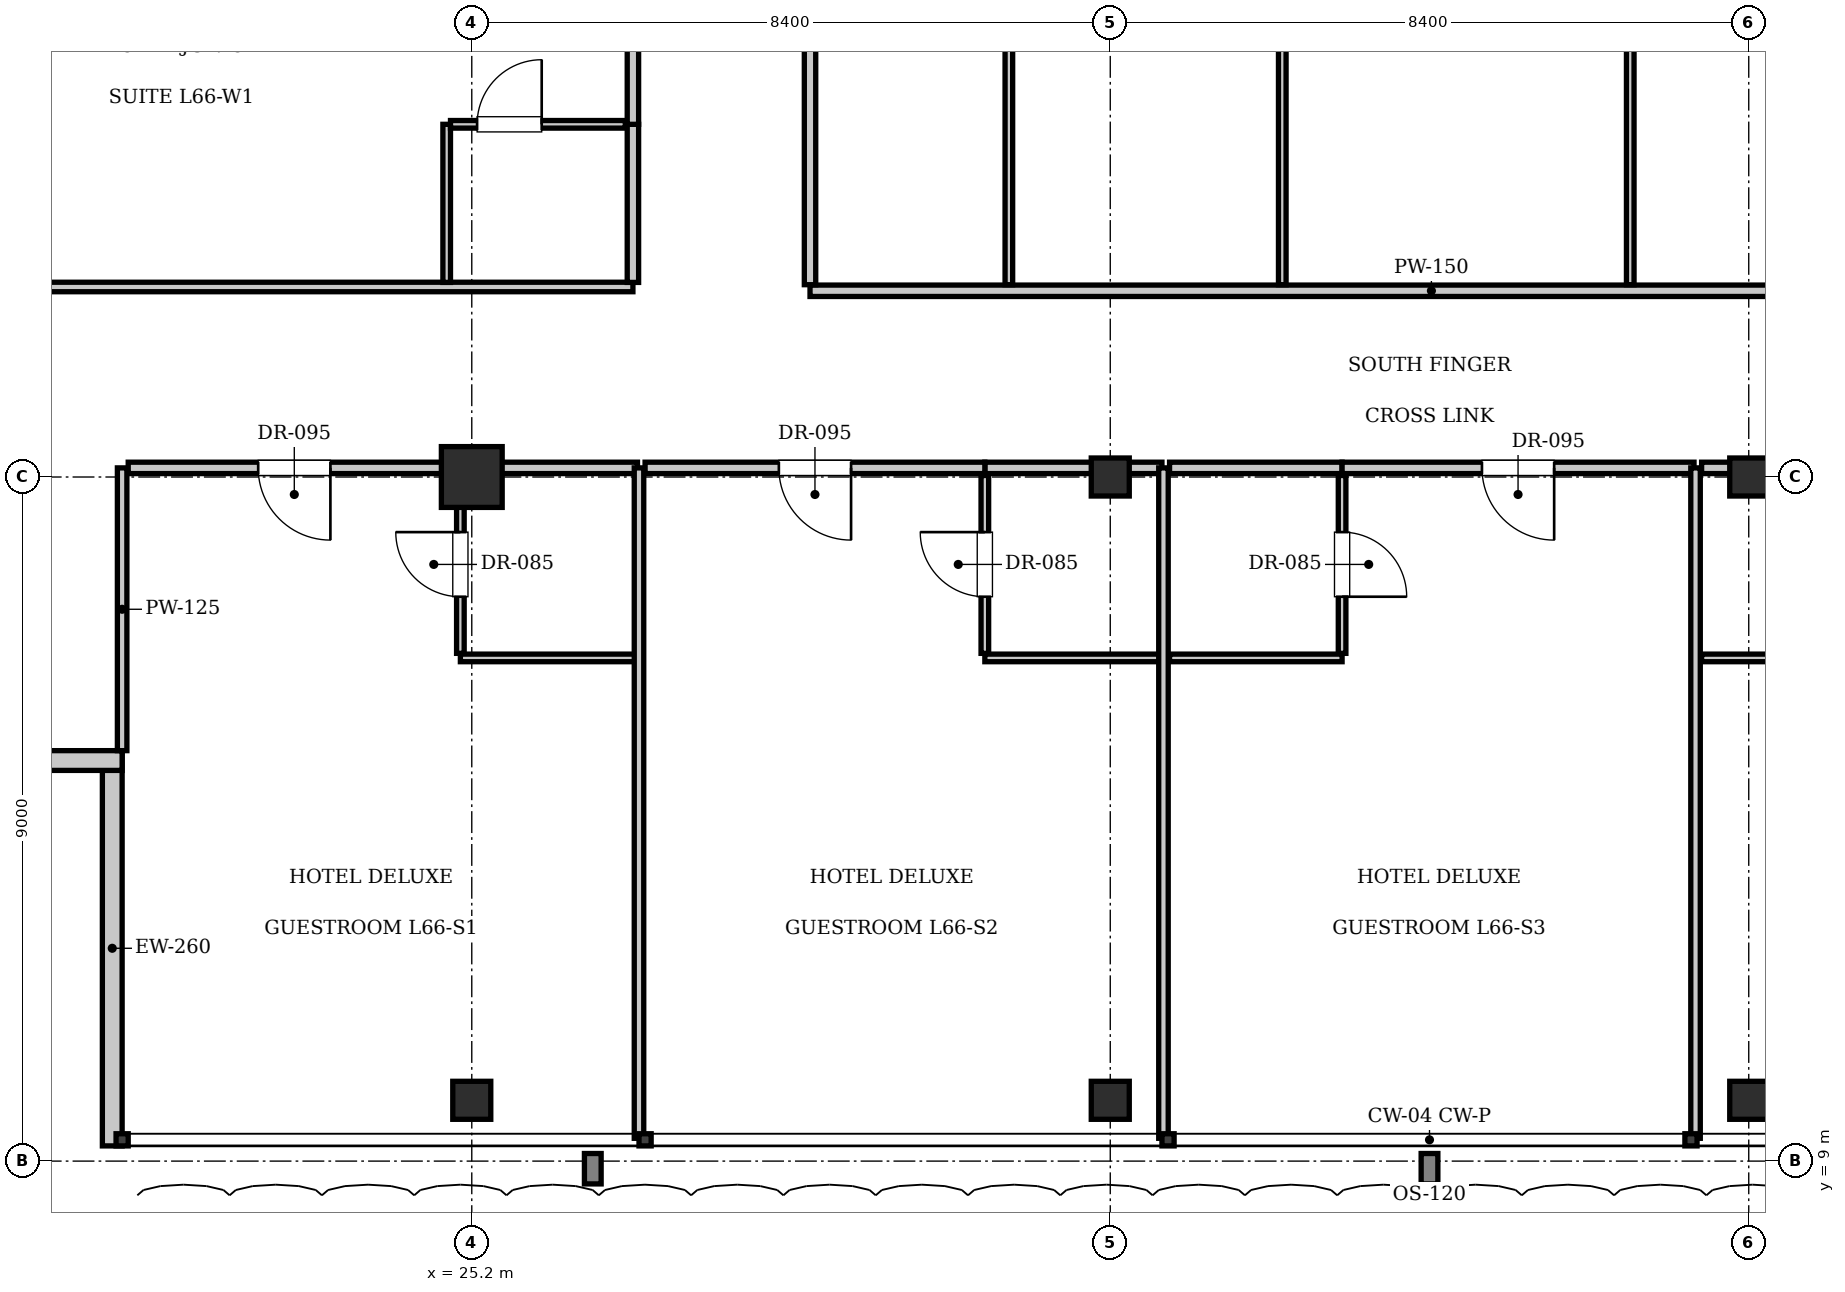
"""IFC4 building model, lengths in metres.
Left out: names, types, materials, properties, quantities, classifications, styles, units other than length and angle.
Written with IfcOpenShell. Run it as: python <this file> out.ifc"""

import sys

from ifc_helpers import new_model, si_unit, direction, frame, frame_2d, origin, origin_2d, place, context, subcontext, project, spatial, rectangle, i_section, extrude, element, fill, save


model = new_model("IFC4")
c1 = context("Model", 3, precision=1e-05, world=origin(), true_north=direction((0.0, 1.0)))
c2 = subcontext(c1, "Body", "Model", "MODEL_VIEW")
j1 = project(units=[si_unit("LENGTHUNIT", "METRE"), si_unit("PLANEANGLEUNIT", "RADIAN")], contexts=[c1])
p1 = place(None, origin())
s1 = spatial("IfcSite", under=j1, at=p1, CompositionType="ELEMENT")
p2 = place(p1, origin())
s2 = spatial("IfcBuilding", under=s1, at=p2, CompositionType="ELEMENT")
p3 = place(p2, frame((0.0, 0.0, 270.2)))
s3 = spatial("IfcBuildingStorey", under=s2, at=p3, CompositionType="ELEMENT", Elevation=270.2)
p4 = place(p3, frame((25.2, 18.0, 0.0), z_axis=(0.0, 0.0, 1.0), x_axis=(1.0, 0.0, 0.0)))
e1 = element("IfcColumn", 1, at=p4, inside=s3, PredefinedType="COLUMN", context=c2, shape_type="SweptSolid", body=[
    extrude(rectangle(XDim=0.8, YDim=0.8, at=origin_2d()), origin(), (0.0, 0.0, 1.0), 3.85),
])
for number, where, z_axis, x_axis in (
    (2, (33.6, 18.0, 0.0), (0.0, 0.0, 1.0), (1.0, 0.0, 0.0)),
    (3, (42.0, 18.0, 0.0), (0.0, 0.0, 1.0), (1.0, 0.0, 0.0)),
    (4, (25.2, 9.8, 0.0), (0.0, 0.0, 1.0), (1.0, 0.0, 0.0)),
    (5, (33.6, 9.8, 0.0), (0.0, 0.0, 1.0), (1.0, 0.0, 0.0)),
    (6, (42.0, 9.8, 0.0), (0.0, 0.0, 1.0), (1.0, 0.0, 0.0)),
):
    element("IfcColumn", number, at=place(p3, frame(where, z_axis=z_axis, x_axis=x_axis)), inside=s3, PredefinedType="COLUMN", context=c2, shape_type="SweptSolid", body=[
        extrude(i_section(OverallWidth=0.5, OverallDepth=0.5, WebThickness=0.022, FlangeThickness=0.032, at=origin_2d()), origin(), (0.0, 0.0, 1.0), 3.85),
    ])
p5 = place(p3, frame((20.47, 9.2, 0.0), z_axis=(0.0, 0.0, 1.0), x_axis=(0.0, 1.0, 0.0)))
e7 = element("IfcWall", 7, at=p5, inside=s3, PredefinedType="SOLIDWALL", context=c2, shape_type="SweptSolid", body=[
    extrude(rectangle(XDim=5.2, YDim=0.26, at=frame_2d((2.6, 0.0))), origin(), (0.0, 0.0, 1.0), 3.61),
])
p6 = place(p3, frame((20.6, 14.27, 0.0), z_axis=(0.0, 0.0, 1.0), x_axis=(-1.0, 0.0, 0.0)))
e8 = element("IfcWall", 8, at=p6, inside=s3, PredefinedType="SOLIDWALL", context=c2, shape_type="SweptSolid", body=[
    extrude(rectangle(XDim=5.2, YDim=0.26, at=frame_2d((2.6, 0.0))), origin(), (0.0, 0.0, 1.0), 3.61),
])
p7 = place(p6, frame((1.6, 0.0, 0.9)))
e9 = element("IfcOpeningElement", 9, at=p7, cuts=e8, PredefinedType="OPENING", context=c2, shape_type="SweptSolid", body=[
    extrude(rectangle(XDim=2.0, YDim=2.2, at=frame_2d((1.0, 1.1))), frame((0.0, 0.14, 0.0), z_axis=(0.0, -1.0, 0.0), x_axis=(1.0, 0.0, 0.0)), (0.0, 0.0, 1.0), 0.28),
])
p8 = place(p3, frame((29.65, 20.45, 0.0), z_axis=(0.0, 0.0, 1.0), x_axis=(1.0, 0.0, 0.0)))
e10 = element("IfcWall", 10, at=p8, inside=s3, PredefinedType="PARTITIONING", context=c2, shape_type="SweptSolid", body=[
    extrude(rectangle(XDim=16.35, YDim=0.15, at=frame_2d((8.175, 0.0))), origin(), (0.0, 0.0, 1.0), 3.61),
])
p9 = place(p3, frame((29.65, 20.53, 0.0), z_axis=(0.0, 0.0, 1.0), x_axis=(0.0, 1.0, 0.0)))
e11 = element("IfcWall", 11, at=p9, inside=s3, PredefinedType="PARTITIONING", context=c2, shape_type="SweptSolid", body=[
    extrude(rectangle(XDim=9.29, YDim=0.15, at=frame_2d((4.645, 0.0))), origin(), (0.0, 0.0, 1.0), 3.61),
])
for number, where, z_axis, x_axis in (
    (12, (32.266, 20.53, 0.0), (0.0, 0.0, 1.0), (0.0, 1.0, 0.0)),
    (13, (35.863, 20.53, 0.0), (0.0, 0.0, 1.0), (0.0, 1.0, 0.0)),
    (14, (40.441, 20.53, 0.0), (0.0, 0.0, 1.0), (0.0, 1.0, 0.0)),
):
    element("IfcWall", number, at=place(p3, frame(where, z_axis=z_axis, x_axis=x_axis)), inside=s3, PredefinedType="PARTITIONING", context=c2, shape_type="SweptSolid", body=[
        extrude(rectangle(XDim=9.29, YDim=0.1, at=frame_2d((4.645, 0.0))), origin(), (0.0, 0.0, 1.0), 3.61),
    ])
p10 = place(p3, frame((20.6, 14.4, 0.0), z_axis=(0.0, 0.0, 1.0), x_axis=(0.0, 1.0, 0.0)))
e15 = element("IfcWall", 15, at=p10, inside=s3, PredefinedType="PARTITIONING", context=c2, shape_type="SweptSolid", body=[
    extrude(rectangle(XDim=3.72, YDim=0.125, at=frame_2d((1.86, 0.0))), origin(), (0.0, 0.0, 1.0), 3.61),
])
p11 = place(p3, frame((25.05, 18.12, 0.0), z_axis=(0.0, 0.0, 1.0), x_axis=(1.0, 0.0, 0.0)))
e16 = element("IfcWall", 16, at=p11, inside=s3, PredefinedType="PARTITIONING", context=c2, shape_type="SweptSolid", body=[
    extrude(rectangle(XDim=2.33, YDim=0.15, at=frame_2d((1.165, 0.0))), origin(), (0.0, 0.0, 1.0), 3.077),
])
p12 = place(p3, frame((25.05, 15.62, 0.0), z_axis=(0.0, 0.0, 1.0), x_axis=(1.0, 0.0, 0.0)))
e17 = element("IfcWall", 17, at=p12, inside=s3, PredefinedType="PARTITIONING", context=c2, shape_type="SweptSolid", body=[
    extrude(rectangle(XDim=2.31, YDim=0.1, at=frame_2d((1.155, 0.0))), origin(), (0.0, 0.0, 1.0), 3.61),
])
p13 = place(p3, frame((25.05, 15.68, 0.0), z_axis=(0.0, 0.0, 1.0), x_axis=(0.0, 1.0, 0.0)))
e18 = element("IfcWall", 18, at=p13, inside=s3, PredefinedType="PARTITIONING", context=c2, shape_type="SweptSolid", body=[
    extrude(rectangle(XDim=2.34, YDim=0.1, at=frame_2d((1.17, 0.0))), origin(), (0.0, 0.0, 1.0), 3.61),
])
p14 = place(p13, frame((0.745, 0.0, 0.0)))
e19 = element("IfcOpeningElement", 19, at=p14, cuts=e18, PredefinedType="OPENING", context=c2, shape_type="SweptSolid", body=[
    extrude(rectangle(XDim=0.85, YDim=2.1, at=frame_2d((0.425, 1.05))), frame((0.0, 0.06, 0.0), z_axis=(0.0, -1.0, 0.0), x_axis=(1.0, 0.0, 0.0)), (0.0, 0.0, 1.0), 0.12),
])
p15 = place(p3, frame((20.68, 18.12, 0.0), z_axis=(0.0, 0.0, 1.0), x_axis=(1.0, 0.0, 0.0)))
e20 = element("IfcWall", 20, at=p15, inside=s3, PredefinedType="PARTITIONING", context=c2, shape_type="SweptSolid", body=[
    extrude(rectangle(XDim=4.37, YDim=0.15, at=frame_2d((2.185, 0.0))), origin(), (0.0, 0.0, 1.0), 3.077),
])
p16 = place(p15, frame((1.71, 0.0, 0.0)))
e21 = element("IfcOpeningElement", 21, at=p16, cuts=e20, PredefinedType="OPENING", context=c2, shape_type="SweptSolid", body=[
    extrude(rectangle(XDim=0.95, YDim=2.15, at=frame_2d((0.475, 1.075))), frame((0.0, 0.085, 0.0), z_axis=(0.0, -1.0, 0.0), x_axis=(1.0, 0.0, 0.0)), (0.0, 0.0, 1.0), 0.17),
])
p17 = place(p3, frame((27.4, 9.3, 0.0), z_axis=(0.0, 0.0, 1.0), x_axis=(0.0, 1.0, 0.0)))
e22 = element("IfcWall", 22, at=p17, inside=s3, PredefinedType="PARTITIONING", context=c2, shape_type="SweptSolid", body=[
    extrude(rectangle(XDim=8.82, YDim=0.125, at=frame_2d((4.41, 0.0))), origin(), (0.0, 0.0, 1.0), 3.61),
])
p18 = place(p3, frame((31.95, 18.12, 0.0), z_axis=(0.0, 0.0, 1.0), x_axis=(1.0, 0.0, 0.0)))
e23 = element("IfcWall", 23, at=p18, inside=s3, PredefinedType="PARTITIONING", context=c2, shape_type="SweptSolid", body=[
    extrude(rectangle(XDim=2.33, YDim=0.15, at=frame_2d((1.165, 0.0))), origin(), (0.0, 0.0, 1.0), 3.077),
])
p19 = place(p3, frame((31.95, 15.62, 0.0), z_axis=(0.0, 0.0, 1.0), x_axis=(1.0, 0.0, 0.0)))
e24 = element("IfcWall", 24, at=p19, inside=s3, PredefinedType="PARTITIONING", context=c2, shape_type="SweptSolid", body=[
    extrude(rectangle(XDim=2.31, YDim=0.1, at=frame_2d((1.155, 0.0))), origin(), (0.0, 0.0, 1.0), 3.61),
])
p20 = place(p3, frame((31.95, 15.68, 0.0), z_axis=(0.0, 0.0, 1.0), x_axis=(0.0, 1.0, 0.0)))
e25 = element("IfcWall", 25, at=p20, inside=s3, PredefinedType="PARTITIONING", context=c2, shape_type="SweptSolid", body=[
    extrude(rectangle(XDim=2.34, YDim=0.1, at=frame_2d((1.17, 0.0))), origin(), (0.0, 0.0, 1.0), 3.61),
])
p21 = place(p20, frame((0.745, 0.0, 0.0)))
e26 = element("IfcOpeningElement", 26, at=p21, cuts=e25, PredefinedType="OPENING", context=c2, shape_type="SweptSolid", body=[
    extrude(rectangle(XDim=0.85, YDim=2.1, at=frame_2d((0.425, 1.05))), frame((0.0, 0.06, 0.0), z_axis=(0.0, -1.0, 0.0), x_axis=(1.0, 0.0, 0.0)), (0.0, 0.0, 1.0), 0.12),
])
p22 = place(p3, frame((27.48, 18.12, 0.0), z_axis=(0.0, 0.0, 1.0), x_axis=(1.0, 0.0, 0.0)))
e27 = element("IfcWall", 27, at=p22, inside=s3, PredefinedType="PARTITIONING", context=c2, shape_type="SweptSolid", body=[
    extrude(rectangle(XDim=4.47, YDim=0.15, at=frame_2d((2.235, 0.0))), origin(), (0.0, 0.0, 1.0), 3.077),
])
p23 = place(p22, frame((1.76, 0.0, 0.0)))
e28 = element("IfcOpeningElement", 28, at=p23, cuts=e27, PredefinedType="OPENING", context=c2, shape_type="SweptSolid", body=[
    extrude(rectangle(XDim=0.95, YDim=2.15, at=frame_2d((0.475, 1.075))), frame((0.0, 0.085, 0.0), z_axis=(0.0, -1.0, 0.0), x_axis=(1.0, 0.0, 0.0)), (0.0, 0.0, 1.0), 0.17),
])
p24 = place(p3, frame((34.3, 9.3, 0.0), z_axis=(0.0, 0.0, 1.0), x_axis=(0.0, 1.0, 0.0)))
e29 = element("IfcWall", 29, at=p24, inside=s3, PredefinedType="PARTITIONING", context=c2, shape_type="SweptSolid", body=[
    extrude(rectangle(XDim=8.82, YDim=0.125, at=frame_2d((4.41, 0.0))), origin(), (0.0, 0.0, 1.0), 3.61),
])
p25 = place(p3, frame((34.38, 18.12, 0.0), z_axis=(0.0, 0.0, 1.0), x_axis=(1.0, 0.0, 0.0)))
e30 = element("IfcWall", 30, at=p25, inside=s3, PredefinedType="PARTITIONING", context=c2, shape_type="SweptSolid", body=[
    extrude(rectangle(XDim=2.27, YDim=0.15, at=frame_2d((1.135, 0.0))), origin(), (0.0, 0.0, 1.0), 3.077),
])
p26 = place(p3, frame((34.38, 15.62, 0.0), z_axis=(0.0, 0.0, 1.0), x_axis=(1.0, 0.0, 0.0)))
e31 = element("IfcWall", 31, at=p26, inside=s3, PredefinedType="PARTITIONING", context=c2, shape_type="SweptSolid", body=[
    extrude(rectangle(XDim=2.27, YDim=0.1, at=frame_2d((1.135, 0.0))), origin(), (0.0, 0.0, 1.0), 3.61),
])
p27 = place(p3, frame((36.65, 15.68, 0.0), z_axis=(0.0, 0.0, 1.0), x_axis=(0.0, 1.0, 0.0)))
e32 = element("IfcWall", 32, at=p27, inside=s3, PredefinedType="PARTITIONING", context=c2, shape_type="SweptSolid", body=[
    extrude(rectangle(XDim=2.34, YDim=0.1, at=frame_2d((1.17, 0.0))), origin(), (0.0, 0.0, 1.0), 3.61),
])
p28 = place(p27, frame((0.745, 0.0, 0.0)))
e33 = element("IfcOpeningElement", 33, at=p28, cuts=e32, PredefinedType="OPENING", context=c2, shape_type="SweptSolid", body=[
    extrude(rectangle(XDim=0.85, YDim=2.1, at=frame_2d((0.425, 1.05))), frame((0.0, 0.06, 0.0), z_axis=(0.0, -1.0, 0.0), x_axis=(1.0, 0.0, 0.0)), (0.0, 0.0, 1.0), 0.12),
])
p29 = place(p3, frame((36.65, 18.12, 0.0), z_axis=(0.0, 0.0, 1.0), x_axis=(1.0, 0.0, 0.0)))
e34 = element("IfcWall", 34, at=p29, inside=s3, PredefinedType="PARTITIONING", context=c2, shape_type="SweptSolid", body=[
    extrude(rectangle(XDim=4.63, YDim=0.15, at=frame_2d((2.315, 0.0))), origin(), (0.0, 0.0, 1.0), 3.077),
])
p30 = place(p29, frame((1.84, 0.0, 0.0)))
e35 = element("IfcOpeningElement", 35, at=p30, cuts=e34, PredefinedType="OPENING", context=c2, shape_type="SweptSolid", body=[
    extrude(rectangle(XDim=0.95, YDim=2.15, at=frame_2d((0.475, 1.075))), frame((0.0, 0.085, 0.0), z_axis=(0.0, -1.0, 0.0), x_axis=(1.0, 0.0, 0.0)), (0.0, 0.0, 1.0), 0.17),
])
p31 = place(p3, frame((41.3, 9.3, 0.0), z_axis=(0.0, 0.0, 1.0), x_axis=(0.0, 1.0, 0.0)))
e36 = element("IfcWall", 36, at=p31, inside=s3, PredefinedType="PARTITIONING", context=c2, shape_type="SweptSolid", body=[
    extrude(rectangle(XDim=8.82, YDim=0.125, at=frame_2d((4.41, 0.0))), origin(), (0.0, 0.0, 1.0), 3.61),
])
p32 = place(p3, frame((41.38, 18.12, 0.0), z_axis=(0.0, 0.0, 1.0), x_axis=(1.0, 0.0, 0.0)))
e37 = element("IfcWall", 37, at=p32, inside=s3, PredefinedType="PARTITIONING", context=c2, shape_type="SweptSolid", body=[
    extrude(rectangle(XDim=2.27, YDim=0.15, at=frame_2d((1.135, 0.0))), origin(), (0.0, 0.0, 1.0), 3.077),
])
p33 = place(p3, frame((41.38, 15.62, 0.0), z_axis=(0.0, 0.0, 1.0), x_axis=(1.0, 0.0, 0.0)))
e38 = element("IfcWall", 38, at=p33, inside=s3, PredefinedType="PARTITIONING", context=c2, shape_type="SweptSolid", body=[
    extrude(rectangle(XDim=2.27, YDim=0.1, at=frame_2d((1.135, 0.0))), origin(), (0.0, 0.0, 1.0), 3.61),
])
p34 = place(p3, frame((15.5, 20.5, 0.0), z_axis=(0.0, 0.0, 1.0), x_axis=(1.0, 0.0, 0.0)))
e39 = element("IfcWall", 39, at=p34, inside=s3, PredefinedType="PARTITIONING", context=c2, shape_type="SweptSolid", body=[
    extrude(rectangle(XDim=11.82, YDim=0.125, at=frame_2d((5.91, 0.0))), origin(), (0.0, 0.0, 1.0), 3.61),
])
p35 = place(p3, frame((27.32, 20.56, 0.0), z_axis=(0.0, 0.0, 1.0), x_axis=(0.0, 1.0, 0.0)))
e40 = element("IfcWall", 40, at=p35, inside=s3, PredefinedType="PARTITIONING", context=c2, shape_type="SweptSolid", body=[
    extrude(rectangle(XDim=2.08, YDim=0.15, at=frame_2d((1.04, 0.0))), origin(), (0.0, 0.0, 1.0), 3.61),
])
p36 = place(p3, frame((27.32, 22.64, 0.0), z_axis=(0.0, 0.0, 1.0), x_axis=(0.0, 1.0, 0.0)))
e41 = element("IfcWall", 41, at=p36, inside=s3, PredefinedType="PARTITIONING", context=c2, shape_type="SweptSolid", body=[
    extrude(rectangle(XDim=3.74, YDim=0.15, at=frame_2d((1.87, 0.0))), origin(), (0.0, 0.0, 1.0), 3.61),
])
p37 = place(p36, frame((1.395, 0.0, 0.0)))
e42 = element("IfcOpeningElement", 42, at=p37, cuts=e41, PredefinedType="OPENING", context=c2, shape_type="SweptSolid", body=[
    extrude(rectangle(XDim=0.95, YDim=2.15, at=frame_2d((0.475, 1.075))), frame((0.0, 0.085, 0.0), z_axis=(0.0, -1.0, 0.0), x_axis=(1.0, 0.0, 0.0)), (0.0, 0.0, 1.0), 0.17),
])
p38 = place(p3, frame((24.87, 20.56, 0.0), z_axis=(0.0, 0.0, 1.0), x_axis=(0.0, 1.0, 0.0)))
e43 = element("IfcWall", 43, at=p38, inside=s3, PredefinedType="PARTITIONING", context=c2, shape_type="SweptSolid", body=[
    extrude(rectangle(XDim=2.08, YDim=0.1, at=frame_2d((1.04, 0.0))), origin(), (0.0, 0.0, 1.0), 3.61),
])
p39 = place(p3, frame((24.92, 22.64, 0.0), z_axis=(0.0, 0.0, 1.0), x_axis=(1.0, 0.0, 0.0)))
e44 = element("IfcWall", 44, at=p39, inside=s3, PredefinedType="PARTITIONING", context=c2, shape_type="SweptSolid", body=[
    extrude(rectangle(XDim=2.3, YDim=0.1, at=frame_2d((1.15, 0.0))), origin(), (0.0, 0.0, 1.0), 3.61),
])
p40 = place(p39, frame((0.35, 0.0, 0.0)))
e45 = element("IfcOpeningElement", 45, at=p40, cuts=e44, PredefinedType="OPENING", context=c2, shape_type="SweptSolid", body=[
    extrude(rectangle(XDim=0.85, YDim=2.1, at=frame_2d((0.425, 1.05))), frame((0.0, 0.06, 0.0), z_axis=(0.0, -1.0, 0.0), x_axis=(1.0, 0.0, 0.0)), (0.0, 0.0, 1.0), 0.12),
])
p41 = place(p14, origin())
e46 = element("IfcDoor", 46, at=p41, inside=s3, OperationType="SINGLE_SWING_RIGHT", PredefinedType="DOOR", context=c2, shape_type="SweptSolid", body=[
    extrude(rectangle(XDim=0.85, YDim=2.1, at=frame_2d((0.425, 1.05))), frame((0.0, 0.025, 0.0), z_axis=(0.0, -1.0, 0.0), x_axis=(1.0, 0.0, 0.0)), (0.0, 0.0, 1.0), 0.05),
])
fill(e19, e46)
p42 = place(p16, frame((0.95, 0.0, 0.0), z_axis=(0.0, 0.0, 1.0), x_axis=(-1.0, 0.0, 0.0)))
e47 = element("IfcDoor", 47, at=p42, inside=s3, OperationType="SINGLE_SWING_LEFT", PredefinedType="DOOR", context=c2, shape_type="SweptSolid", body=[
    extrude(rectangle(XDim=0.95, YDim=2.15, at=frame_2d((0.475, 1.075))), frame((0.0, 0.025, 0.0), z_axis=(0.0, -1.0, 0.0), x_axis=(1.0, 0.0, 0.0)), (0.0, 0.0, 1.0), 0.05),
])
fill(e21, e47)
p43 = place(p21, origin())
e48 = element("IfcDoor", 48, at=p43, inside=s3, OperationType="SINGLE_SWING_RIGHT", PredefinedType="DOOR", context=c2, shape_type="SweptSolid", body=[
    extrude(rectangle(XDim=0.85, YDim=2.1, at=frame_2d((0.425, 1.05))), frame((0.0, 0.025, 0.0), z_axis=(0.0, -1.0, 0.0), x_axis=(1.0, 0.0, 0.0)), (0.0, 0.0, 1.0), 0.05),
])
fill(e26, e48)
p44 = place(p23, frame((0.95, 0.0, 0.0), z_axis=(0.0, 0.0, 1.0), x_axis=(-1.0, 0.0, 0.0)))
e49 = element("IfcDoor", 49, at=p44, inside=s3, OperationType="SINGLE_SWING_LEFT", PredefinedType="DOOR", context=c2, shape_type="SweptSolid", body=[
    extrude(rectangle(XDim=0.95, YDim=2.15, at=frame_2d((0.475, 1.075))), frame((0.0, 0.025, 0.0), z_axis=(0.0, -1.0, 0.0), x_axis=(1.0, 0.0, 0.0)), (0.0, 0.0, 1.0), 0.05),
])
fill(e28, e49)
p45 = place(p28, frame((0.85, 0.0, 0.0), z_axis=(0.0, 0.0, 1.0), x_axis=(-1.0, 0.0, 0.0)))
e50 = element("IfcDoor", 50, at=p45, inside=s3, OperationType="SINGLE_SWING_RIGHT", PredefinedType="DOOR", context=c2, shape_type="SweptSolid", body=[
    extrude(rectangle(XDim=0.85, YDim=2.1, at=frame_2d((0.425, 1.05))), frame((0.0, 0.025, 0.0), z_axis=(0.0, -1.0, 0.0), x_axis=(1.0, 0.0, 0.0)), (0.0, 0.0, 1.0), 0.05),
])
fill(e33, e50)
p46 = place(p30, frame((0.95, 0.0, 0.0), z_axis=(0.0, 0.0, 1.0), x_axis=(-1.0, 0.0, 0.0)))
e51 = element("IfcDoor", 51, at=p46, inside=s3, OperationType="SINGLE_SWING_LEFT", PredefinedType="DOOR", context=c2, shape_type="SweptSolid", body=[
    extrude(rectangle(XDim=0.95, YDim=2.15, at=frame_2d((0.475, 1.075))), frame((0.0, 0.025, 0.0), z_axis=(0.0, -1.0, 0.0), x_axis=(1.0, 0.0, 0.0)), (0.0, 0.0, 1.0), 0.05),
])
fill(e35, e51)
p47 = place(p40, origin())
e52 = element("IfcDoor", 52, at=p47, inside=s3, OperationType="SINGLE_SWING_RIGHT", PredefinedType="DOOR", context=c2, shape_type="SweptSolid", body=[
    extrude(rectangle(XDim=0.85, YDim=2.1, at=frame_2d((0.425, 1.05))), frame((0.0, 0.025, 0.0), z_axis=(0.0, -1.0, 0.0), x_axis=(1.0, 0.0, 0.0)), (0.0, 0.0, 1.0), 0.05),
])
fill(e45, e52)
save(model, sys.argv[1])
